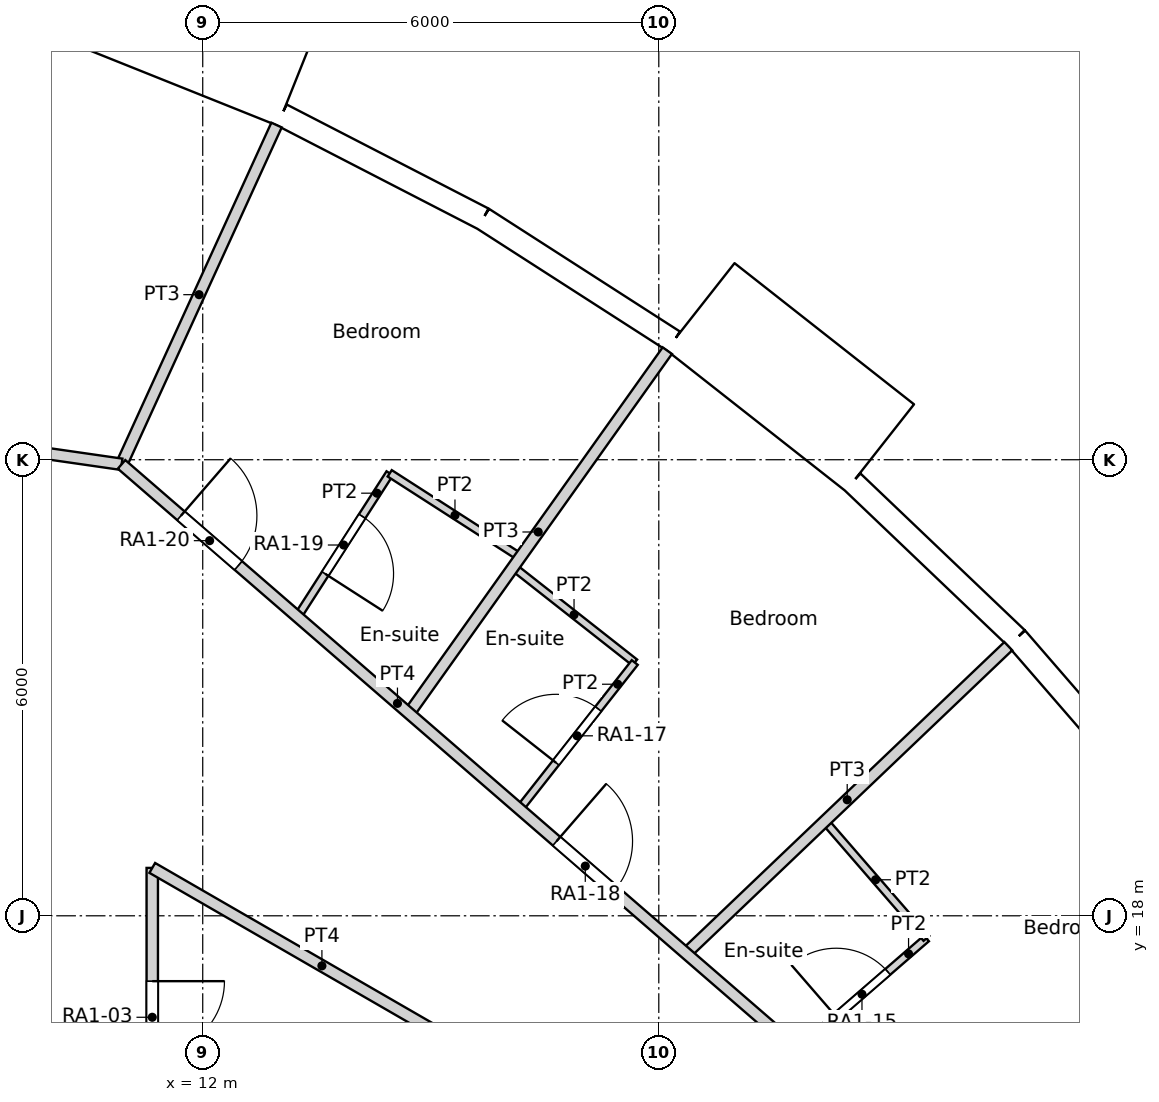
"""IFC4 building model, lengths in metres.
Left out: names, types, materials, properties, quantities, classifications, styles, units other than length and angle.
Written with IfcOpenShell. Run it as: python <this file> out.ifc"""

import sys

from ifc_helpers import new_model, si_unit, direction, frame, frame_2d, origin, origin_2d, place, context, subcontext, project, spatial, rectangle, circle, extrude, element, fill, save


model = new_model("IFC4")
c1 = context("Model", 3, precision=1e-05, world=origin(), true_north=direction((0.0, 1.0)))
c2 = subcontext(c1, "Body", "Model", "MODEL_VIEW")
j1 = project(units=[si_unit("LENGTHUNIT", "METRE"), si_unit("PLANEANGLEUNIT", "RADIAN")], contexts=[c1])
p1 = place(None, origin())
s1 = spatial("IfcSite", under=j1, at=p1, CompositionType="ELEMENT")
p2 = place(p1, origin())
s2 = spatial("IfcBuilding", under=s1, at=p2, CompositionType="ELEMENT")
p3 = place(p2, frame((0.0, 0.0, 28.2)))
s3 = spatial("IfcBuildingStorey", under=s2, at=p3, CompositionType="ELEMENT", Elevation=28.2)
for number, where, z_axis, x_axis in (
    (1, (21.911, 20.892, 0.0), (0.0, 0.0, 1.0), (1.0, 0.0, 0.0)),
    (2, (17.561, 24.661, 0.0), (0.0, 0.0, 1.0), (1.0, 0.0, 0.0)),
    (3, (12.576, 27.539, 0.0), (0.0, 0.0, 1.0), (1.0, 0.0, 0.0)),
):
    element("IfcColumn", number, at=place(p3, frame(where, z_axis=z_axis, x_axis=x_axis)), inside=s3, PredefinedType="COLUMN", context=c2, shape_type="SweptSolid", body=[
        extrude(circle(Radius=0.7, at=origin_2d()), origin(), (0.0, 0.0, 1.0), 3.6),
    ])
for number, where, z_axis, x_axis in (
    (4, (14.659, 19.69, 0.0), (0.0, 0.0, 1.0), (1.0, 0.0, 0.0)),
    (5, (9.723, 22.54, 0.0), (0.0, 0.0, 1.0), (1.0, 0.0, 0.0)),
):
    element("IfcColumn", number, at=place(p3, frame(where, z_axis=z_axis, x_axis=x_axis)), inside=s3, PredefinedType="COLUMN", context=c2, shape_type="SweptSolid", body=[
        extrude(circle(Radius=0.75, at=origin_2d()), origin(), (0.0, 0.0, 1.0), 3.6),
    ])
p4 = place(p3, frame((24.658, 19.399, 0.0), z_axis=(0.0, 0.0, 1.0), x_axis=(-0.654830712471, 0.755775587066, 0.0)))
e6 = element("IfcWall", 6, at=p4, inside=s3, PredefinedType="SOLIDWALL", context=c2, shape_type="SweptSolid", body=[
    extrude(rectangle(XDim=2.98, YDim=0.3, at=frame_2d((1.49, 0.0))), origin(), (0.0, 0.0, 1.0), 3.15),
])
p5 = place(p4, frame((1.49, 0.0, 1.55)))
e7 = element("IfcOpeningElement", 7, at=p5, cuts=e6, PredefinedType="OPENING", context=c2, shape_type="SweptSolid", body=[
    extrude(circle(Radius=0.9, at=origin_2d()), frame((0.0, 0.16, 0.0), z_axis=(0.0, -1.0, 0.0), x_axis=(1.0, 0.0, 0.0)), (0.0, 0.0, 1.0), 0.32),
])
p6 = place(p3, frame((22.707, 21.651, 0.0), z_axis=(0.0, 0.0, 1.0), x_axis=(-0.723744206617, 0.690068346896, 0.0)))
e8 = element("IfcWall", 8, at=p6, inside=s3, PredefinedType="SOLIDWALL", context=c2, shape_type="SweptSolid", body=[
    extrude(rectangle(XDim=2.98, YDim=0.3, at=frame_2d((1.49, 0.0))), origin(), (0.0, 0.0, 1.0), 3.15),
])
p7 = place(p6, frame((1.49, 0.0, 1.55)))
e9 = element("IfcOpeningElement", 9, at=p7, cuts=e8, PredefinedType="OPENING", context=c2, shape_type="SweptSolid", body=[
    extrude(circle(Radius=0.9, at=origin_2d()), frame((0.0, 0.16, 0.0), z_axis=(0.0, -1.0, 0.0), x_axis=(1.0, 0.0, 0.0)), (0.0, 0.0, 1.0), 0.32),
])
p8 = place(p3, frame((20.907, 24.159, -0.45), z_axis=(0.0, 0.0, 1.0), x_axis=(-0.786049992888, 0.618162930529, 0.0)))
e10 = element("IfcWall", 10, at=p8, inside=s3, PredefinedType="ELEMENTEDWALL", context=c2, shape_type="SweptSolid", body=[
    extrude(rectangle(XDim=3.0, YDim=1.45, at=frame_2d((1.5, 0.0))), origin(), (0.0, 0.0, 1.0), 3.6),
])
p9 = place(p8, frame((1.5, 0.0, 2.0)))
e11 = element("IfcOpeningElement", 11, at=p9, cuts=e10, PredefinedType="OPENING", context=c2, shape_type="SweptSolid", body=[
    extrude(circle(Radius=0.9, at=origin_2d()), frame((0.0, 0.735, 0.0), z_axis=(0.0, -1.0, 0.0), x_axis=(1.0, 0.0, 0.0)), (0.0, 0.0, 1.0), 1.47),
])
p10 = place(p3, frame((18.194, 25.56, 0.0), z_axis=(0.0, 0.0, 1.0), x_axis=(-0.84122372879, 0.540687190639, 0.0)))
e12 = element("IfcWall", 12, at=p10, inside=s3, PredefinedType="SOLIDWALL", context=c2, shape_type="SweptSolid", body=[
    extrude(rectangle(XDim=2.98, YDim=0.3, at=frame_2d((1.49, 0.0))), origin(), (0.0, 0.0, 1.0), 3.15),
])
p11 = place(p10, frame((1.49, 0.0, 1.55)))
e13 = element("IfcOpeningElement", 13, at=p11, cuts=e12, PredefinedType="OPENING", context=c2, shape_type="SweptSolid", body=[
    extrude(circle(Radius=0.9, at=origin_2d()), frame((0.0, 0.16, 0.0), z_axis=(0.0, -1.0, 0.0), x_axis=(1.0, 0.0, 0.0)), (0.0, 0.0, 1.0), 0.32),
])
p12 = place(p3, frame((15.687, 27.171, 0.0), z_axis=(0.0, 0.0, 1.0), x_axis=(-0.888853225096, 0.4581920386, 0.0)))
e14 = element("IfcWall", 14, at=p12, inside=s3, PredefinedType="SOLIDWALL", context=c2, shape_type="SweptSolid", body=[
    extrude(rectangle(XDim=2.979, YDim=0.3, at=frame_2d((1.49, 0.0))), origin(), (0.0, 0.0, 1.0), 3.15),
])
p13 = place(p12, frame((1.49, 0.0, 1.55)))
e15 = element("IfcOpeningElement", 15, at=p13, cuts=e14, PredefinedType="OPENING", context=c2, shape_type="SweptSolid", body=[
    extrude(circle(Radius=0.9, at=origin_2d()), frame((0.0, 0.16, 0.0), z_axis=(0.0, -1.0, 0.0), x_axis=(1.0, 0.0, 0.0)), (0.0, 0.0, 1.0), 0.32),
])
p14 = place(p3, frame((13.254, 29.07, -0.45), z_axis=(0.0, 0.0, 1.0), x_axis=(-0.928358776184, 0.371685327504, 0.0)))
e16 = element("IfcWall", 16, at=p14, inside=s3, PredefinedType="ELEMENTEDWALL", context=c2, shape_type="SweptSolid", body=[
    extrude(rectangle(XDim=3.0, YDim=1.45, at=frame_2d((1.5, 0.0))), origin(), (0.0, 0.0, 1.0), 3.6),
])
p15 = place(p14, frame((1.5, 0.0, 2.0)))
e17 = element("IfcOpeningElement", 17, at=p15, cuts=e16, PredefinedType="OPENING", context=c2, shape_type="SweptSolid", body=[
    extrude(circle(Radius=0.9, at=origin_2d()), frame((0.0, 0.735, 0.0), z_axis=(0.0, -1.0, 0.0), x_axis=(1.0, 0.0, 0.0)), (0.0, 0.0, 1.0), 1.47),
])
p16 = place(p3, frame((10.932, 23.939, 0.0), z_axis=(0.0, 0.0, 1.0), x_axis=(0.755838982892, -0.654757536757, 0.0)))
e18 = element("IfcWall", 18, at=p16, inside=s3, PredefinedType="PARTITIONING", context=c2, shape_type="SweptSolid", body=[
    extrude(rectangle(XDim=14.83, YDim=0.15, at=frame_2d((7.415, 0.0))), origin(), (0.0, 0.0, 1.0), 3.15),
])
p17 = place(p16, frame((12.796, 0.0, 0.0)))
e19 = element("IfcOpeningElement", 19, at=p17, cuts=e18, PredefinedType="OPENING", context=c2, shape_type="SweptSolid", body=[
    extrude(rectangle(XDim=1.0, YDim=2.1, at=frame_2d((0.5, 1.05))), frame((0.0, 0.075, 0.0), z_axis=(0.0, -1.0, 0.0), x_axis=(1.0, 0.0, 0.0)), (0.0, 0.0, 1.0), 0.15),
])
p18 = place(p16, frame((7.572, 0.0, 0.0)))
e20 = element("IfcOpeningElement", 20, at=p18, cuts=e18, PredefinedType="OPENING", context=c2, shape_type="SweptSolid", body=[
    extrude(rectangle(XDim=1.0, YDim=2.1, at=frame_2d((0.5, 1.05))), frame((0.0, 0.075, 0.0), z_axis=(0.0, -1.0, 0.0), x_axis=(1.0, 0.0, 0.0)), (0.0, 0.0, 1.0), 0.15),
])
p19 = place(p16, frame((1.033, 0.0, 0.0)))
e21 = element("IfcOpeningElement", 21, at=p19, cuts=e18, PredefinedType="OPENING", context=c2, shape_type="SweptSolid", body=[
    extrude(rectangle(XDim=1.0, YDim=2.1, at=frame_2d((0.5, 1.05))), frame((0.0, 0.075, 0.0), z_axis=(0.0, -1.0, 0.0), x_axis=(1.0, 0.0, 0.0)), (0.0, 0.0, 1.0), 0.15),
])
p20 = place(p3, frame((11.336, 18.63, 0.0), z_axis=(0.0, 0.0, 1.0), x_axis=(0.866063337164, -0.499934291702, 0.0)))
e22 = element("IfcWall", 22, at=p20, inside=s3, PredefinedType="PARTITIONING", context=c2, shape_type="SweptSolid", body=[
    extrude(rectangle(XDim=5.155, YDim=0.15, at=frame_2d((2.577, 0.0))), origin(), (0.0, 0.0, 1.0), 3.15),
])
p21 = place(p3, frame((11.336, 11.8, 0.0), z_axis=(0.0, 0.0, 1.0), x_axis=(0.0, 1.0, 0.0)))
e23 = element("IfcWall", 23, at=p21, inside=s3, PredefinedType="PARTITIONING", context=c2, shape_type="SweptSolid", body=[
    extrude(rectangle(XDim=6.83, YDim=0.15, at=frame_2d((3.415, 0.0))), origin(), (0.0, 0.0, 1.0), 3.15),
])
p22 = place(p21, frame((4.39, 0.0, 0.0)))
e24 = element("IfcOpeningElement", 24, at=p22, cuts=e23, PredefinedType="OPENING", context=c2, shape_type="SweptSolid", body=[
    extrude(rectangle(XDim=0.95, YDim=2.1, at=frame_2d((0.475, 1.05))), frame((0.0, 0.075, 0.0), z_axis=(0.0, -1.0, 0.0), x_axis=(1.0, 0.0, 0.0)), (0.0, 0.0, 1.0), 0.15),
])
p23 = place(p3, frame((-3.746, 26.051, 0.0), z_axis=(0.0, 0.0, 1.0), x_axis=(0.989821009857, -0.142317843033, 0.0)))
e25 = element("IfcWall", 25, at=p23, inside=s3, PredefinedType="PARTITIONING", context=c2, shape_type="SweptSolid", body=[
    extrude(rectangle(XDim=14.83, YDim=0.15, at=frame_2d((7.415, 0.0))), origin(), (0.0, 0.0, 1.0), 3.15),
])
p24 = place(p23, frame((9.415, 0.0, 0.0)))
e26 = element("IfcOpeningElement", 26, at=p24, cuts=e25, PredefinedType="OPENING", context=c2, shape_type="SweptSolid", body=[
    extrude(rectangle(XDim=1.8, YDim=2.1, at=frame_2d((0.9, 1.05))), frame((0.0, 0.075, 0.0), z_axis=(0.0, -1.0, 0.0), x_axis=(1.0, 0.0, 0.0)), (0.0, 0.0, 1.0), 0.15),
])
p25 = place(p23, frame((3.314, 0.0, 0.0)))
e27 = element("IfcOpeningElement", 27, at=p25, cuts=e25, PredefinedType="OPENING", context=c2, shape_type="SweptSolid", body=[
    extrude(rectangle(XDim=1.0, YDim=2.1, at=frame_2d((0.5, 1.05))), frame((0.0, 0.075, 0.0), z_axis=(0.0, -1.0, 0.0), x_axis=(1.0, 0.0, 0.0)), (0.0, 0.0, 1.0), 0.15),
])
p26 = place(p3, frame((22.141, 14.229, 0.0), z_axis=(0.0, 0.0, 1.0), x_axis=(0.841265781699, 0.540621757371, 0.0)))
e28 = element("IfcWall", 28, at=p26, inside=s3, PredefinedType="PARTITIONING", context=c2, shape_type="SweptSolid", body=[
    extrude(rectangle(XDim=4.906, YDim=0.15, at=frame_2d((2.453, 0.0))), origin(), (0.0, 0.0, 1.0), 3.15),
])
p27 = place(p3, frame((19.826, 16.234, 0.0), z_axis=(0.0, 0.0, 1.0), x_axis=(0.755703447798, 0.654913963042, 0.0)))
e29 = element("IfcWall", 29, at=p27, inside=s3, PredefinedType="PARTITIONING", context=c2, shape_type="SweptSolid", body=[
    extrude(rectangle(XDim=2.243, YDim=0.1, at=frame_2d((1.122, 0.0))), origin(), (0.0, 0.0, 1.0), 3.15),
])
p28 = place(p27, frame((0.671, 0.0, 0.0)))
e30 = element("IfcOpeningElement", 30, at=p28, cuts=e29, PredefinedType="OPENING", context=c2, shape_type="SweptSolid", body=[
    extrude(rectangle(XDim=0.9, YDim=2.04, at=frame_2d((0.45, 1.02))), frame((0.0, 0.05, 0.0), z_axis=(0.0, -1.0, 0.0), x_axis=(1.0, 0.0, 0.0)), (0.0, 0.0, 1.0), 0.1),
])
p29 = place(p3, frame((20.184, 19.245, 0.0), z_axis=(0.0, 0.0, 1.0), x_axis=(0.655017058368, -0.755614090159, 0.0)))
e31 = element("IfcWall", 31, at=p29, inside=s3, PredefinedType="PARTITIONING", context=c2, shape_type="SweptSolid", body=[
    extrude(rectangle(XDim=2.041, YDim=0.1, at=frame_2d((1.021, 0.0))), origin(), (0.0, 0.0, 1.0), 3.15),
])
p30 = place(p3, frame((18.36, 17.505, 0.0), z_axis=(0.0, 0.0, 1.0), x_axis=(0.723686703731, 0.690128650937, 0.0)))
e32 = element("IfcWall", 32, at=p30, inside=s3, PredefinedType="PARTITIONING", context=c2, shape_type="SweptSolid", body=[
    extrude(rectangle(XDim=5.856, YDim=0.15, at=frame_2d((2.928, 0.0))), origin(), (0.0, 0.0, 1.0), 3.15),
])
p31 = place(p3, frame((16.168, 19.404, 0.0), z_axis=(0.0, 0.0, 1.0), x_axis=(0.618142414415, 0.786066126672, 0.0)))
e33 = element("IfcWall", 33, at=p31, inside=s3, PredefinedType="PARTITIONING", context=c2, shape_type="SweptSolid", body=[
    extrude(rectangle(XDim=2.453, YDim=0.1, at=frame_2d((1.226, 0.0))), origin(), (0.0, 0.0, 1.0), 3.15),
])
p32 = place(p31, frame((0.776, 0.0, 0.0)))
e34 = element("IfcOpeningElement", 34, at=p32, cuts=e33, PredefinedType="OPENING", context=c2, shape_type="SweptSolid", body=[
    extrude(rectangle(XDim=0.9, YDim=2.04, at=frame_2d((0.45, 1.02))), frame((0.0, 0.05, 0.0), z_axis=(0.0, -1.0, 0.0), x_axis=(1.0, 0.0, 0.0)), (0.0, 0.0, 1.0), 0.1),
])
p33 = place(p3, frame((16.086, 22.589, 0.0), z_axis=(0.0, 0.0, 1.0), x_axis=(0.785984904201, -0.618245687707, 0.0)))
e35 = element("IfcWall", 35, at=p33, inside=s3, PredefinedType="PARTITIONING", context=c2, shape_type="SweptSolid", body=[
    extrude(rectangle(XDim=2.033, YDim=0.1, at=frame_2d((1.017, 0.0))), origin(), (0.0, 0.0, 1.0), 3.15),
])
p34 = place(p3, frame((14.715, 20.664, 0.0), z_axis=(0.0, 0.0, 1.0), x_axis=(0.57995989616, 0.814645026282, 0.0)))
e36 = element("IfcWall", 36, at=p34, inside=s3, PredefinedType="PARTITIONING", context=c2, shape_type="SweptSolid", body=[
    extrude(rectangle(XDim=5.857, YDim=0.15, at=frame_2d((2.928, 0.0))), origin(), (0.0, 0.0, 1.0), 3.15),
])
p35 = place(p3, frame((14.46, 23.821, 0.0), z_axis=(0.0, 0.0, 1.0), x_axis=(0.841135728185, -0.540824081168, 0.0)))
e37 = element("IfcWall", 37, at=p35, inside=s3, PredefinedType="PARTITIONING", context=c2, shape_type="SweptSolid", body=[
    extrude(rectangle(XDim=2.041, YDim=0.1, at=frame_2d((1.021, 0.0))), origin(), (0.0, 0.0, 1.0), 3.15),
])
p36 = place(p3, frame((13.248, 21.935, 0.0), z_axis=(0.0, 0.0, 1.0), x_axis=(0.540597960994, 0.841281073464, 0.0)))
e38 = element("IfcWall", 38, at=p36, inside=s3, PredefinedType="PARTITIONING", context=c2, shape_type="SweptSolid", body=[
    extrude(rectangle(XDim=2.242, YDim=0.1, at=frame_2d((1.121, 0.0))), origin(), (0.0, 0.0, 1.0), 3.15),
])
p37 = place(p36, frame((0.671, 0.0, 0.0)))
e39 = element("IfcOpeningElement", 39, at=p37, cuts=e38, PredefinedType="OPENING", context=c2, shape_type="SweptSolid", body=[
    extrude(rectangle(XDim=0.9, YDim=2.04, at=frame_2d((0.45, 1.02))), frame((0.0, 0.05, 0.0), z_axis=(0.0, -1.0, 0.0), x_axis=(1.0, 0.0, 0.0)), (0.0, 0.0, 1.0), 0.1),
])
p38 = place(p3, frame((10.933, 23.94, 0.0), z_axis=(0.0, 0.0, 1.0), x_axis=(0.415346954488, 0.909663073559, 0.0)))
e40 = element("IfcWall", 40, at=p38, inside=s3, PredefinedType="PARTITIONING", context=c2, shape_type="SweptSolid", body=[
    extrude(rectangle(XDim=4.906, YDim=0.15, at=frame_2d((2.453, 0.0))), origin(), (0.0, 0.0, 1.0), 3.15),
])
p39 = place(p5, origin())
e41 = element("IfcWindow", 41, at=p39, inside=s3, PartitioningType="SINGLE_PANEL", PredefinedType="WINDOW", context=c2, shape_type="SweptSolid", body=[
    extrude(circle(Radius=0.9, at=origin_2d()), frame((0.0, 0.12, 0.0), z_axis=(0.0, -1.0, 0.0), x_axis=(1.0, 0.0, 0.0)), (0.0, 0.0, 1.0), 0.1),
])
fill(e7, e41)
p40 = place(p7, origin())
e42 = element("IfcWindow", 42, at=p40, inside=s3, PartitioningType="SINGLE_PANEL", PredefinedType="WINDOW", context=c2, shape_type="SweptSolid", body=[
    extrude(circle(Radius=0.9, at=origin_2d()), frame((0.0, 0.12, 0.0), z_axis=(0.0, -1.0, 0.0), x_axis=(1.0, 0.0, 0.0)), (0.0, 0.0, 1.0), 0.1),
])
fill(e9, e42)
p41 = place(p9, origin())
e43 = element("IfcWindow", 43, at=p41, inside=s3, PartitioningType="SINGLE_PANEL", PredefinedType="WINDOW", context=c2, shape_type="SweptSolid", body=[
    extrude(circle(Radius=0.9, at=origin_2d()), frame((0.0, 0.695, 0.0), z_axis=(0.0, -1.0, 0.0), x_axis=(1.0, 0.0, 0.0)), (0.0, 0.0, 1.0), 0.1),
])
fill(e11, e43)
p42 = place(p11, origin())
e44 = element("IfcWindow", 44, at=p42, inside=s3, PartitioningType="SINGLE_PANEL", PredefinedType="WINDOW", context=c2, shape_type="SweptSolid", body=[
    extrude(circle(Radius=0.9, at=origin_2d()), frame((0.0, 0.12, 0.0), z_axis=(0.0, -1.0, 0.0), x_axis=(1.0, 0.0, 0.0)), (0.0, 0.0, 1.0), 0.1),
])
fill(e13, e44)
p43 = place(p13, origin())
e45 = element("IfcWindow", 45, at=p43, inside=s3, PartitioningType="SINGLE_PANEL", PredefinedType="WINDOW", context=c2, shape_type="SweptSolid", body=[
    extrude(circle(Radius=0.9, at=origin_2d()), frame((0.0, 0.12, 0.0), z_axis=(0.0, -1.0, 0.0), x_axis=(1.0, 0.0, 0.0)), (0.0, 0.0, 1.0), 0.1),
])
fill(e15, e45)
p44 = place(p15, origin())
e46 = element("IfcWindow", 46, at=p44, inside=s3, PartitioningType="SINGLE_PANEL", PredefinedType="WINDOW", context=c2, shape_type="SweptSolid", body=[
    extrude(circle(Radius=0.9, at=origin_2d()), frame((0.0, 0.695, 0.0), z_axis=(0.0, -1.0, 0.0), x_axis=(1.0, 0.0, 0.0)), (0.0, 0.0, 1.0), 0.1),
])
fill(e17, e46)
p45 = place(p22, origin())
e47 = element("IfcDoor", 47, at=p45, inside=s3, OperationType="SINGLE_SWING_LEFT", PredefinedType="DOOR", context=c2, shape_type="SweptSolid", body=[
    extrude(rectangle(XDim=0.95, YDim=2.1, at=frame_2d((0.475, 1.05))), frame((0.0, 0.025, 0.0), z_axis=(0.0, -1.0, 0.0), x_axis=(1.0, 0.0, 0.0)), (0.0, 0.0, 1.0), 0.05),
])
fill(e24, e47)
p46 = place(p28, origin())
e48 = element("IfcDoor", 48, at=p46, inside=s3, OperationType="SINGLE_SWING_LEFT", PredefinedType="DOOR", context=c2, shape_type="SweptSolid", body=[
    extrude(rectangle(XDim=0.9, YDim=2.04, at=frame_2d((0.45, 1.02))), frame((0.0, 0.025, 0.0), z_axis=(0.0, -1.0, 0.0), x_axis=(1.0, 0.0, 0.0)), (0.0, 0.0, 1.0), 0.05),
])
fill(e30, e48)
p47 = place(p32, origin())
e49 = element("IfcDoor", 49, at=p47, inside=s3, OperationType="SINGLE_SWING_LEFT", PredefinedType="DOOR", context=c2, shape_type="SweptSolid", body=[
    extrude(rectangle(XDim=0.9, YDim=2.04, at=frame_2d((0.45, 1.02))), frame((0.0, 0.025, 0.0), z_axis=(0.0, -1.0, 0.0), x_axis=(1.0, 0.0, 0.0)), (0.0, 0.0, 1.0), 0.05),
])
fill(e34, e49)
p48 = place(p18, origin())
e50 = element("IfcDoor", 50, at=p48, inside=s3, OperationType="SINGLE_SWING_LEFT", PredefinedType="DOOR", context=c2, shape_type="SweptSolid", body=[
    extrude(rectangle(XDim=1.0, YDim=2.1, at=frame_2d((0.5, 1.05))), frame((0.0, 0.025, 0.0), z_axis=(0.0, -1.0, 0.0), x_axis=(1.0, 0.0, 0.0)), (0.0, 0.0, 1.0), 0.05),
])
fill(e20, e50)
p49 = place(p37, origin())
e51 = element("IfcDoor", 51, at=p49, inside=s3, OperationType="SINGLE_SWING_RIGHT", PredefinedType="DOOR", context=c2, shape_type="SweptSolid", body=[
    extrude(rectangle(XDim=0.9, YDim=2.04, at=frame_2d((0.45, 1.02))), frame((0.0, 0.025, 0.0), z_axis=(0.0, -1.0, 0.0), x_axis=(1.0, 0.0, 0.0)), (0.0, 0.0, 1.0), 0.05),
])
fill(e39, e51)
p50 = place(p19, origin())
e52 = element("IfcDoor", 52, at=p50, inside=s3, OperationType="SINGLE_SWING_LEFT", PredefinedType="DOOR", context=c2, shape_type="SweptSolid", body=[
    extrude(rectangle(XDim=1.0, YDim=2.1, at=frame_2d((0.5, 1.05))), frame((0.0, 0.025, 0.0), z_axis=(0.0, -1.0, 0.0), x_axis=(1.0, 0.0, 0.0)), (0.0, 0.0, 1.0), 0.05),
])
fill(e21, e52)
save(model, sys.argv[1])
